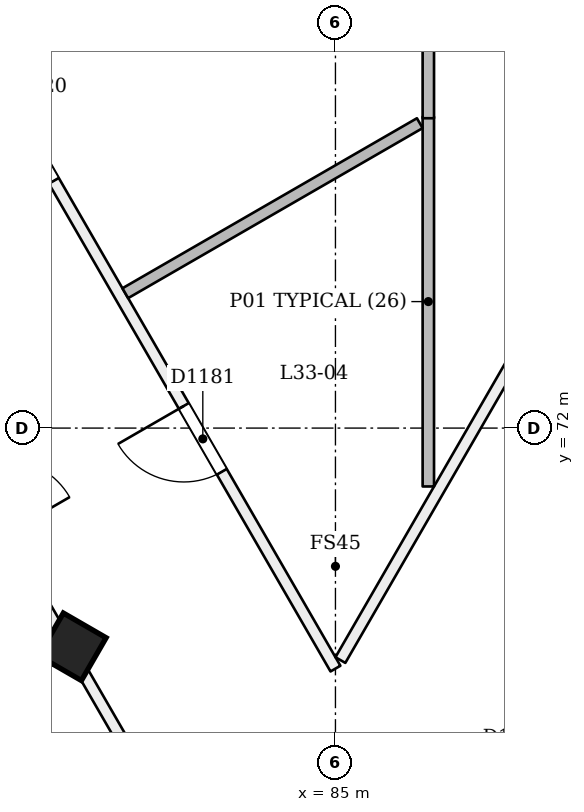
"""IFC4 building model, lengths in metres.
Left out: names, types, materials, properties, quantities, classifications, styles, units other than length and angle.
Written with IfcOpenShell. Run it as: python <this file> out.ifc"""

import sys

from ifc_helpers import new_model, si_unit, direction, frame, frame_2d, origin, origin_2d, place, context, subcontext, project, spatial, rectangle, extrude, element, fill, save


model = new_model("IFC4")
c1 = context("Model", 3, precision=1e-05, world=origin(), true_north=direction((0.0, 1.0)))
c2 = subcontext(c1, "Body", "Model", "MODEL_VIEW")
j1 = project(units=[si_unit("LENGTHUNIT", "METRE"), si_unit("PLANEANGLEUNIT", "RADIAN")], contexts=[c1])
p1 = place(None, origin())
s1 = spatial("IfcSite", under=j1, at=p1, CompositionType="ELEMENT")
p2 = place(p1, origin())
s2 = spatial("IfcBuilding", under=s1, at=p2, CompositionType="ELEMENT")
p3 = place(p2, frame((0.0, 0.0, 131.4)))
s3 = spatial("IfcBuildingStorey", under=s2, at=p3, CompositionType="ELEMENT", Elevation=131.4)
p4 = place(p3, frame((81.512, 69.076, -0.02), z_axis=(0.022155133694, 0.038483534979, 0.999013597298), x_axis=(-0.864982357223, -0.500326545966, 0.038456067068)))
e1 = element("IfcColumn", 1, at=p4, inside=s3, PredefinedType="COLUMN", context=c2, shape_type="SweptSolid", body=[
    extrude(rectangle(XDim=0.65, YDim=0.65, at=origin_2d()), origin(), (0.0, 0.0, 1.0), 3.604),
])
p5 = place(p3, frame((85.0, 68.836, 0.0), z_axis=(0.0, 0.0, 1.0), x_axis=(-0.500001726771, 0.86602440683, 0.0)))
e2 = element("IfcWall", 2, at=p5, inside=s3, PredefinedType="PARTITIONING", context=c2, shape_type="SweptSolid", body=[
    extrude(rectangle(XDim=24.669, YDim=0.15, at=frame_2d((12.335, 0.0))), origin(), (0.0, 0.0, 1.0), 3.15),
])
p6 = place(p5, frame((2.99, 0.0, 0.0)))
e3 = element("IfcOpeningElement", 3, at=p6, cuts=e2, PredefinedType="OPENING", context=c2, shape_type="SweptSolid", body=[
    extrude(rectangle(XDim=1.0, YDim=2.1, at=frame_2d((0.5, 1.05))), frame((0.0, 0.085, 0.0), z_axis=(0.0, -1.0, 0.0), x_axis=(1.0, 0.0, 0.0)), (0.0, 0.0, 1.0), 0.171),
])
p7 = place(p5, frame((15.596, 0.0, 0.0)))
e4 = element("IfcOpeningElement", 4, at=p7, cuts=e2, PredefinedType="OPENING", context=c2, shape_type="SweptSolid", body=[
    extrude(rectangle(XDim=1.0, YDim=2.1, at=frame_2d((0.5, 1.05))), frame((0.0, 0.085, 0.0), z_axis=(0.0, -1.0, 0.0), x_axis=(1.0, 0.0, 0.0)), (0.0, 0.0, 1.0), 0.171),
])
p8 = place(p5, frame((20.822, 0.0, 0.0)))
e5 = element("IfcOpeningElement", 5, at=p8, cuts=e2, PredefinedType="OPENING", context=c2, shape_type="SweptSolid", body=[
    extrude(rectangle(XDim=1.0, YDim=2.1, at=frame_2d((0.5, 1.05))), frame((0.0, 0.085, 0.0), z_axis=(0.0, -1.0, 0.0), x_axis=(1.0, 0.0, 0.0)), (0.0, 0.0, 1.0), 0.171),
])
p9 = place(p5, frame((11.43, 0.0, 0.0)))
e6 = element("IfcOpeningElement", 6, at=p9, cuts=e2, PredefinedType="OPENING", context=c2, shape_type="SweptSolid", body=[
    extrude(rectangle(XDim=1.0, YDim=2.1, at=frame_2d((0.5, 1.05))), frame((0.0, 0.085, 0.0), z_axis=(0.0, -1.0, 0.0), x_axis=(1.0, 0.0, 0.0)), (0.0, 0.0, 1.0), 0.171),
])
p10 = place(p5, frame((7.41, 0.0, 0.0)))
e7 = element("IfcOpeningElement", 7, at=p10, cuts=e2, PredefinedType="OPENING", context=c2, shape_type="SweptSolid", body=[
    extrude(rectangle(XDim=1.0, YDim=2.1, at=frame_2d((0.5, 1.05))), frame((0.0, 0.085, 0.0), z_axis=(0.0, -1.0, 0.0), x_axis=(1.0, 0.0, 0.0)), (0.0, 0.0, 1.0), 0.171),
])
p11 = place(p3, frame((64.656, 98.273, 0.0), z_axis=(0.0, 0.0, 1.0), x_axis=(0.500001784794, -0.866024373331, 0.0)))
e8 = element("IfcWall", 8, at=p11, inside=s3, PredefinedType="PARTITIONING", context=c2, shape_type="SweptSolid", body=[
    extrude(rectangle(XDim=40.426, YDim=0.15, at=frame_2d((20.213, 0.0))), origin(), (0.0, 0.0, 1.0), 2.75),
])
p12 = place(p11, frame((0.2, 0.0, 0.0)))
e9 = element("IfcOpeningElement", 9, at=p12, cuts=e8, PredefinedType="OPENING", context=c2, shape_type="SweptSolid", body=[
    extrude(rectangle(XDim=1.2, YDim=2.1, at=frame_2d((0.6, 1.05))), frame((0.0, 0.085, 0.0), z_axis=(0.0, -1.0, 0.0), x_axis=(1.0, 0.0, 0.0)), (0.0, 0.0, 1.0), 0.171),
])
p13 = place(p11, frame((2.933, 0.0, 0.0)))
e10 = element("IfcOpeningElement", 10, at=p13, cuts=e8, PredefinedType="OPENING", context=c2, shape_type="SweptSolid", body=[
    extrude(rectangle(XDim=1.0, YDim=2.1, at=frame_2d((0.5, 1.05))), frame((0.0, 0.085, 0.0), z_axis=(0.0, -1.0, 0.0), x_axis=(1.0, 0.0, 0.0)), (0.0, 0.0, 1.0), 0.171),
])
p14 = place(p11, frame((9.608, 0.0, 0.0)))
e11 = element("IfcOpeningElement", 11, at=p14, cuts=e8, PredefinedType="OPENING", context=c2, shape_type="SweptSolid", body=[
    extrude(rectangle(XDim=1.0, YDim=2.1, at=frame_2d((0.5, 1.05))), frame((0.0, 0.085, 0.0), z_axis=(0.0, -1.0, 0.0), x_axis=(1.0, 0.0, 0.0)), (0.0, 0.0, 1.0), 0.171),
])
p15 = place(p11, frame((11.818, 0.0, 0.0)))
e12 = element("IfcOpeningElement", 12, at=p15, cuts=e8, PredefinedType="OPENING", context=c2, shape_type="SweptSolid", body=[
    extrude(rectangle(XDim=1.0, YDim=2.1, at=frame_2d((0.5, 1.05))), frame((0.0, 0.085, 0.0), z_axis=(0.0, -1.0, 0.0), x_axis=(1.0, 0.0, 0.0)), (0.0, 0.0, 1.0), 0.171),
])
p16 = place(p11, frame((18.493, 0.0, 0.0)))
e13 = element("IfcOpeningElement", 13, at=p16, cuts=e8, PredefinedType="OPENING", context=c2, shape_type="SweptSolid", body=[
    extrude(rectangle(XDim=1.0, YDim=2.1, at=frame_2d((0.5, 1.05))), frame((0.0, 0.085, 0.0), z_axis=(0.0, -1.0, 0.0), x_axis=(1.0, 0.0, 0.0)), (0.0, 0.0, 1.0), 0.171),
])
p17 = place(p11, frame((21.963, 0.0, 0.0)))
e14 = element("IfcOpeningElement", 14, at=p17, cuts=e8, PredefinedType="OPENING", context=c2, shape_type="SweptSolid", body=[
    extrude(rectangle(XDim=1.0, YDim=2.1, at=frame_2d((0.5, 1.05))), frame((0.0, 0.085, 0.0), z_axis=(0.0, -1.0, 0.0), x_axis=(1.0, 0.0, 0.0)), (0.0, 0.0, 1.0), 0.171),
])
p18 = place(p11, frame((27.493, 0.0, 0.0)))
e15 = element("IfcOpeningElement", 15, at=p18, cuts=e8, PredefinedType="OPENING", context=c2, shape_type="SweptSolid", body=[
    extrude(rectangle(XDim=1.0, YDim=2.1, at=frame_2d((0.5, 1.05))), frame((0.0, 0.085, 0.0), z_axis=(0.0, -1.0, 0.0), x_axis=(1.0, 0.0, 0.0)), (0.0, 0.0, 1.0), 0.171),
])
p19 = place(p11, frame((30.963, 0.0, 0.0)))
e16 = element("IfcOpeningElement", 16, at=p19, cuts=e8, PredefinedType="OPENING", context=c2, shape_type="SweptSolid", body=[
    extrude(rectangle(XDim=1.0, YDim=2.1, at=frame_2d((0.5, 1.05))), frame((0.0, 0.085, 0.0), z_axis=(0.0, -1.0, 0.0), x_axis=(1.0, 0.0, 0.0)), (0.0, 0.0, 1.0), 0.171),
])
p20 = place(p11, frame((36.493, 0.0, 0.0)))
e17 = element("IfcOpeningElement", 17, at=p20, cuts=e8, PredefinedType="OPENING", context=c2, shape_type="SweptSolid", body=[
    extrude(rectangle(XDim=1.0, YDim=2.1, at=frame_2d((0.5, 1.05))), frame((0.0, 0.085, 0.0), z_axis=(0.0, -1.0, 0.0), x_axis=(1.0, 0.0, 0.0)), (0.0, 0.0, 1.0), 0.171),
])
p21 = place(p11, frame((39.101, 0.0, 0.0)))
e18 = element("IfcOpeningElement", 18, at=p21, cuts=e8, PredefinedType="OPENING", context=c2, shape_type="SweptSolid", body=[
    extrude(rectangle(XDim=1.0, YDim=2.1, at=frame_2d((0.5, 1.05))), frame((0.0, 0.085, 0.0), z_axis=(0.0, -1.0, 0.0), x_axis=(1.0, 0.0, 0.0)), (0.0, 0.0, 1.0), 0.171),
])
p22 = place(p3, frame((85.131, 63.263, 0.0), z_axis=(0.0, 0.0, 1.0), x_axis=(0.500002881847, 0.866023739943, 0.0)))
e19 = element("IfcWall", 19, at=p22, inside=s3, PredefinedType="PARTITIONING", context=c2, shape_type="SweptSolid", body=[
    extrude(rectangle(XDim=34.013, YDim=0.15, at=frame_2d((17.006, 0.0))), origin(), (0.0, 0.0, 1.0), 2.75),
])
p23 = place(p22, frame((0.351, 0.0, 0.0)))
e20 = element("IfcOpeningElement", 20, at=p23, cuts=e19, PredefinedType="OPENING", context=c2, shape_type="SweptSolid", body=[
    extrude(rectangle(XDim=1.2, YDim=2.1, at=frame_2d((0.6, 1.05))), frame((0.0, 0.085, 0.0), z_axis=(0.0, -1.0, 0.0), x_axis=(1.0, 0.0, 0.0)), (0.0, 0.0, 1.0), 0.171),
])
p24 = place(p22, frame((3.963, 0.0, 0.0)))
e21 = element("IfcOpeningElement", 21, at=p24, cuts=e19, PredefinedType="OPENING", context=c2, shape_type="SweptSolid", body=[
    extrude(rectangle(XDim=1.0, YDim=2.1, at=frame_2d((0.5, 1.05))), frame((0.0, 0.085, 0.0), z_axis=(0.0, -1.0, 0.0), x_axis=(1.0, 0.0, 0.0)), (0.0, 0.0, 1.0), 0.171),
])
p25 = place(p22, frame((9.493, 0.0, 0.0)))
e22 = element("IfcOpeningElement", 22, at=p25, cuts=e19, PredefinedType="OPENING", context=c2, shape_type="SweptSolid", body=[
    extrude(rectangle(XDim=1.0, YDim=2.1, at=frame_2d((0.5, 1.05))), frame((0.0, 0.085, 0.0), z_axis=(0.0, -1.0, 0.0), x_axis=(1.0, 0.0, 0.0)), (0.0, 0.0, 1.0), 0.171),
])
p26 = place(p22, frame((11.818, 0.0, 0.0)))
e23 = element("IfcOpeningElement", 23, at=p26, cuts=e19, PredefinedType="OPENING", context=c2, shape_type="SweptSolid", body=[
    extrude(rectangle(XDim=1.0, YDim=2.1, at=frame_2d((0.5, 1.05))), frame((0.0, 0.085, 0.0), z_axis=(0.0, -1.0, 0.0), x_axis=(1.0, 0.0, 0.0)), (0.0, 0.0, 1.0), 0.171),
])
p27 = place(p22, frame((18.608, 0.0, 0.0)))
e24 = element("IfcOpeningElement", 24, at=p27, cuts=e19, PredefinedType="OPENING", context=c2, shape_type="SweptSolid", body=[
    extrude(rectangle(XDim=1.0, YDim=2.1, at=frame_2d((0.5, 1.05))), frame((0.0, 0.085, 0.0), z_axis=(0.0, -1.0, 0.0), x_axis=(1.0, 0.0, 0.0)), (0.0, 0.0, 1.0), 0.171),
])
p28 = place(p22, frame((20.933, 0.0, 0.0)))
e25 = element("IfcOpeningElement", 25, at=p28, cuts=e19, PredefinedType="OPENING", context=c2, shape_type="SweptSolid", body=[
    extrude(rectangle(XDim=1.0, YDim=2.1, at=frame_2d((0.5, 1.05))), frame((0.0, 0.085, 0.0), z_axis=(0.0, -1.0, 0.0), x_axis=(1.0, 0.0, 0.0)), (0.0, 0.0, 1.0), 0.171),
])
p29 = place(p22, frame((27.493, 0.0, 0.0)))
e26 = element("IfcOpeningElement", 26, at=p29, cuts=e19, PredefinedType="OPENING", context=c2, shape_type="SweptSolid", body=[
    extrude(rectangle(XDim=1.0, YDim=2.1, at=frame_2d((0.5, 1.05))), frame((0.0, 0.085, 0.0), z_axis=(0.0, -1.0, 0.0), x_axis=(1.0, 0.0, 0.0)), (0.0, 0.0, 1.0), 0.171),
])
p30 = place(p22, frame((29.933, 0.0, 0.0)))
e27 = element("IfcOpeningElement", 27, at=p30, cuts=e19, PredefinedType="OPENING", context=c2, shape_type="SweptSolid", body=[
    extrude(rectangle(XDim=1.0, YDim=2.1, at=frame_2d((0.5, 1.05))), frame((0.0, 0.085, 0.0), z_axis=(0.0, -1.0, 0.0), x_axis=(1.0, 0.0, 0.0)), (0.0, 0.0, 1.0), 0.171),
])
p31 = place(p3, frame((97.335, 90.2, 0.0), z_axis=(0.0, 0.0, 1.0), x_axis=(-0.500002918398, -0.86602371884, 0.0)))
e28 = element("IfcWall", 28, at=p31, inside=s3, PredefinedType="PARTITIONING", context=c2, shape_type="SweptSolid", body=[
    extrude(rectangle(XDim=24.539, YDim=0.15, at=frame_2d((12.27, 0.0))), origin(), (0.0, 0.0, 1.0), 3.15),
])
p32 = place(p31, frame((6.442, 0.0, 0.0)))
e29 = element("IfcOpeningElement", 29, at=p32, cuts=e28, PredefinedType="OPENING", context=c2, shape_type="SweptSolid", body=[
    extrude(rectangle(XDim=0.9, YDim=2.1, at=frame_2d((0.45, 1.05))), frame((0.0, 0.085, 0.0), z_axis=(0.0, -1.0, 0.0), x_axis=(1.0, 0.0, 0.0)), (0.0, 0.0, 1.0), 0.171),
])
p33 = place(p31, frame((2.46, 0.0, 0.0)))
e30 = element("IfcOpeningElement", 30, at=p33, cuts=e28, PredefinedType="OPENING", context=c2, shape_type="SweptSolid", body=[
    extrude(rectangle(XDim=0.9, YDim=2.1, at=frame_2d((0.45, 1.05))), frame((0.0, 0.085, 0.0), z_axis=(0.0, -1.0, 0.0), x_axis=(1.0, 0.0, 0.0)), (0.0, 0.0, 1.0), 0.171),
])
p34 = place(p31, frame((15.454, 0.0, 0.0)))
e31 = element("IfcOpeningElement", 31, at=p34, cuts=e28, PredefinedType="OPENING", context=c2, shape_type="SweptSolid", body=[
    extrude(rectangle(XDim=1.0, YDim=2.1, at=frame_2d((0.5, 1.05))), frame((0.0, 0.085, 0.0), z_axis=(0.0, -1.0, 0.0), x_axis=(1.0, 0.0, 0.0)), (0.0, 0.0, 1.0), 0.171),
])
p35 = place(p31, frame((10.281, 0.0, 0.0)))
e32 = element("IfcOpeningElement", 32, at=p35, cuts=e28, PredefinedType="OPENING", context=c2, shape_type="SweptSolid", body=[
    extrude(rectangle(XDim=1.0, YDim=2.1, at=frame_2d((0.5, 1.05))), frame((0.0, 0.085, 0.0), z_axis=(0.0, -1.0, 0.0), x_axis=(1.0, 0.0, 0.0)), (0.0, 0.0, 1.0), 0.171),
])
p36 = place(p3, frame((86.222, 71.232, 0.0), z_axis=(0.0, 0.0, 1.0), x_axis=(0.0, 1.0, 0.0)))
e33 = element("IfcWall", 33, at=p36, inside=s3, PredefinedType="PARTITIONING", context=c2, shape_type="SweptSolid", body=[
    extrude(rectangle(XDim=4.864, YDim=0.15, at=frame_2d((2.432, 0.0))), origin(), (0.0, 0.0, 1.0), 3.15),
])
p37 = place(p3, frame((86.109, 76.011, 0.0), z_axis=(0.0, 0.0, 1.0), x_axis=(-0.866024728453, -0.500001169707, 0.0)))
e34 = element("IfcWall", 34, at=p37, inside=s3, PredefinedType="PARTITIONING", context=c2, shape_type="SweptSolid", body=[
    extrude(rectangle(XDim=4.474, YDim=0.15, at=frame_2d((2.237, 0.0))), origin(), (0.0, 0.0, 1.0), 3.15),
])
p38 = place(p3, frame((79.001, 67.626, 0.0), z_axis=(0.0, 0.0, 1.0), x_axis=(0.865989837833, 0.500061596976, 0.0)))
e35 = element("IfcWall", 35, at=p38, inside=s3, PredefinedType="PARTITIONING", context=c2, shape_type="SweptSolid", body=[
    extrude(rectangle(XDim=2.825, YDim=0.1, at=frame_2d((1.413, 0.0))), origin(), (0.0, 0.0, 1.0), 2.75),
])
p39 = place(p3, frame((86.222, 80.81, 0.0), z_axis=(0.0, 0.0, 1.0), x_axis=(0.0, -1.0, 0.0)))
e36 = element("IfcWall", 36, at=p39, inside=s3, PredefinedType="PARTITIONING", context=c2, shape_type="SweptSolid", body=[
    extrude(rectangle(XDim=4.734, YDim=0.15, at=frame_2d((2.367, 0.0))), origin(), (0.0, 0.0, 1.0), 3.15),
])
p40 = place(p6, origin())
e37 = element("IfcDoor", 37, at=p40, inside=s3, OperationType="SINGLE_SWING_RIGHT", PredefinedType="NOTDEFINED", context=c2, shape_type="SweptSolid", body=[
    extrude(rectangle(XDim=1.0, YDim=2.1, at=frame_2d((0.5, 1.05))), frame((0.0, 0.025, 0.0), z_axis=(0.0, -1.0, 0.0), x_axis=(1.0, 0.0, 0.0)), (0.0, 0.0, 1.0), 0.05),
])
fill(e3, e37)
p41 = place(p10, origin())
e38 = element("IfcDoor", 38, at=p41, inside=s3, OperationType="SINGLE_SWING_RIGHT", PredefinedType="NOTDEFINED", context=c2, shape_type="SweptSolid", body=[
    extrude(rectangle(XDim=1.0, YDim=2.1, at=frame_2d((0.5, 1.05))), frame((0.0, 0.025, 0.0), z_axis=(0.0, -1.0, 0.0), x_axis=(1.0, 0.0, 0.0)), (0.0, 0.0, 1.0), 0.05),
])
fill(e7, e38)
save(model, sys.argv[1])
